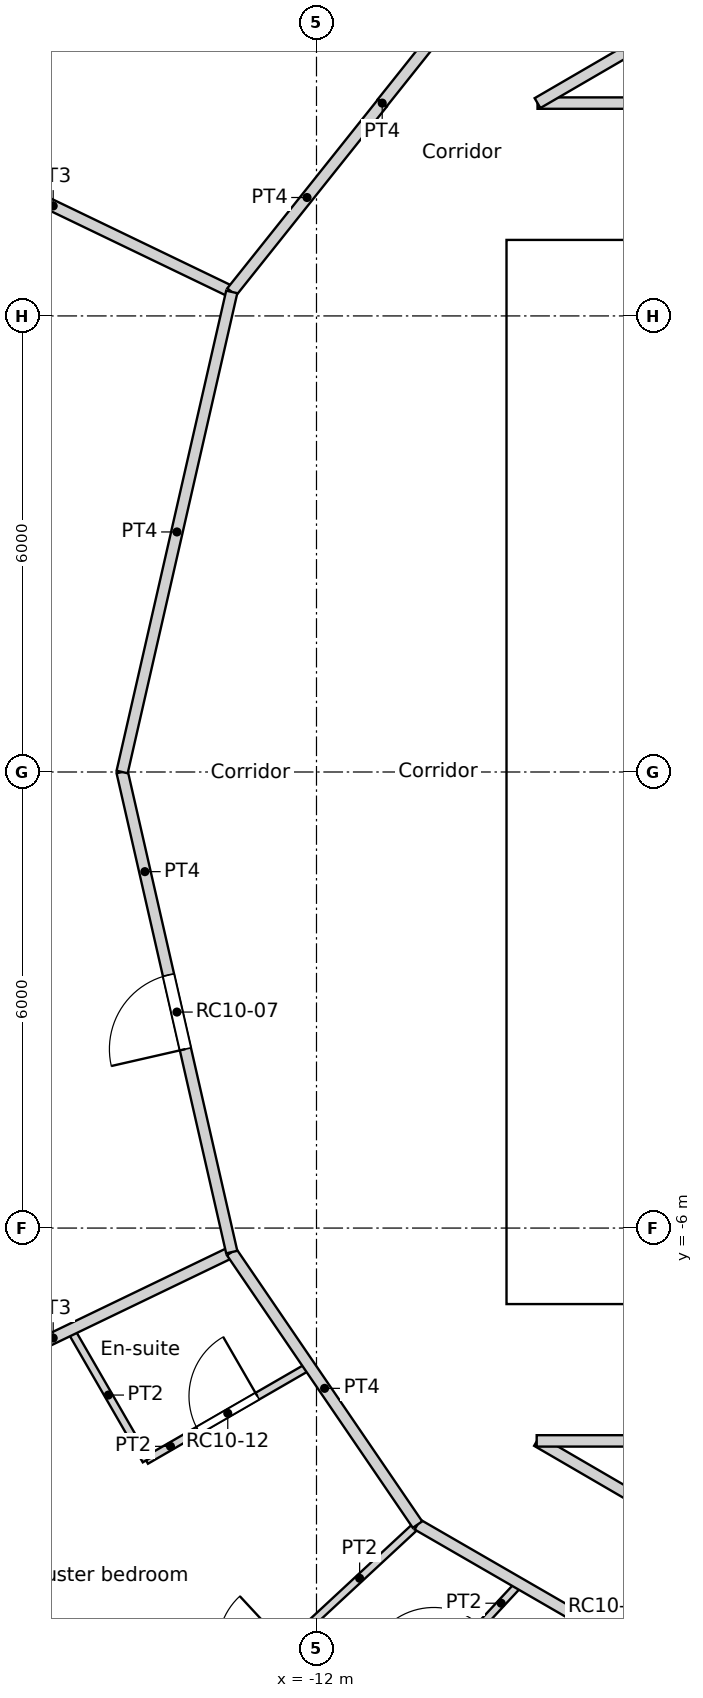
"""IFC4 building model, lengths in metres.
Left out: names, types, materials, properties, quantities, classifications, styles, units other than length and angle.
Written with IfcOpenShell. Run it as: python <this file> out.ifc"""

import sys

from ifc_helpers import new_model, si_unit, direction, frame, frame_2d, origin, place, context, subcontext, project, spatial, rectangle, extrude, element, fill, save


model = new_model("IFC4")
c1 = context("Model", 3, precision=1e-05, world=origin(), true_north=direction((0.0, 1.0)))
c2 = subcontext(c1, "Body", "Model", "MODEL_VIEW")
j1 = project(units=[si_unit("LENGTHUNIT", "METRE"), si_unit("PLANEANGLEUNIT", "RADIAN")], contexts=[c1])
p1 = place(None, origin())
s1 = spatial("IfcSite", under=j1, at=p1, CompositionType="ELEMENT")
p2 = place(p1, origin())
s2 = spatial("IfcBuilding", under=s1, at=p2, CompositionType="ELEMENT")
p3 = place(p2, frame((0.0, 0.0, 323.4)))
s3 = spatial("IfcBuildingStorey", under=s2, at=p3, CompositionType="ELEMENT", Elevation=323.4)
p4 = place(p3, frame((-9.5, -6.7, 0.0), z_axis=(0.0, 0.0, 1.0), x_axis=(1.0, 0.0, 0.0)))
e1 = element("IfcWall", 1, at=p4, inside=s3, PredefinedType="SOLIDWALL", context=c2, shape_type="SweptSolid", body=[
    extrude(rectangle(XDim=19.0, YDim=0.6, at=frame_2d((9.5, 0.0))), origin(), (0.0, 0.0, 1.0), 3.6),
])
p5 = place(p4, frame((10.4, 0.0, 0.0)))
e2 = element("IfcOpeningElement", 2, at=p5, cuts=e1, PredefinedType="OPENING", context=c2, shape_type="SweptSolid", body=[
    extrude(rectangle(XDim=1.0, YDim=2.1, at=frame_2d((0.5, 1.05))), frame((0.0, 0.3, 0.0), z_axis=(0.0, -1.0, 0.0), x_axis=(1.0, 0.0, 0.0)), (0.0, 0.0, 1.0), 0.6),
])
p6 = place(p4, frame((5.35, 0.0, 0.0)))
e3 = element("IfcOpeningElement", 3, at=p6, cuts=e1, PredefinedType="OPENING", context=c2, shape_type="SweptSolid", body=[
    extrude(rectangle(XDim=1.7, YDim=2.1, at=frame_2d((0.85, 1.05))), frame((0.0, 0.3, 0.0), z_axis=(0.0, -1.0, 0.0), x_axis=(1.0, 0.0, 0.0)), (0.0, 0.0, 1.0), 0.6),
])
p7 = place(p4, frame((11.95, 0.0, 0.0)))
e4 = element("IfcOpeningElement", 4, at=p7, cuts=e1, PredefinedType="OPENING", context=c2, shape_type="SweptSolid", body=[
    extrude(rectangle(XDim=1.7, YDim=2.1, at=frame_2d((0.85, 1.05))), frame((0.0, 0.3, 0.0), z_axis=(0.0, -1.0, 0.0), x_axis=(1.0, 0.0, 0.0)), (0.0, 0.0, 1.0), 0.6),
])
p8 = place(p3, frame((-9.5, 6.7, 0.0), z_axis=(0.0, 0.0, 1.0), x_axis=(1.0, 0.0, 0.0)))
e5 = element("IfcWall", 5, at=p8, inside=s3, PredefinedType="SOLIDWALL", context=c2, shape_type="SweptSolid", body=[
    extrude(rectangle(XDim=19.0, YDim=0.6, at=frame_2d((9.5, 0.0))), origin(), (0.0, 0.0, 1.0), 3.6),
])
p9 = place(p8, frame((5.35, 0.0, 0.0)))
e6 = element("IfcOpeningElement", 6, at=p9, cuts=e5, PredefinedType="OPENING", context=c2, shape_type="SweptSolid", body=[
    extrude(rectangle(XDim=1.7, YDim=2.1, at=frame_2d((0.85, 1.05))), frame((0.0, 0.3, 0.0), z_axis=(0.0, -1.0, 0.0), x_axis=(1.0, 0.0, 0.0)), (0.0, 0.0, 1.0), 0.6),
])
p10 = place(p3, frame((-9.2, -6.4, 0.0), z_axis=(0.0, 0.0, 1.0), x_axis=(0.0, 1.0, 0.0)))
e7 = element("IfcWall", 7, at=p10, inside=s3, PredefinedType="SOLIDWALL", context=c2, shape_type="SweptSolid", body=[
    extrude(rectangle(XDim=12.8, YDim=0.6, at=frame_2d((6.4, 0.0))), origin(), (0.0, 0.0, 1.0), 3.6),
])
p11 = place(p3, frame((-8.9, -3.1, 0.0), z_axis=(0.0, 0.0, 1.0), x_axis=(1.0, 0.0, 0.0)))
e8 = element("IfcWall", 8, at=p11, inside=s3, PredefinedType="SOLIDWALL", context=c2, shape_type="SweptSolid", body=[
    extrude(rectangle(XDim=9.6, YDim=0.3, at=frame_2d((4.8, 0.0))), origin(), (0.0, 0.0, 1.0), 3.25),
])
p12 = place(p11, frame((4.75, 0.0, 0.0)))
e9 = element("IfcOpeningElement", 9, at=p12, cuts=e8, PredefinedType="OPENING", context=c2, shape_type="SweptSolid", body=[
    extrude(rectangle(XDim=1.7, YDim=2.1, at=frame_2d((0.85, 1.05))), frame((0.0, 0.15, 0.0), z_axis=(0.0, -1.0, 0.0), x_axis=(1.0, 0.0, 0.0)), (0.0, 0.0, 1.0), 0.3),
])
p13 = place(p3, frame((-8.9, 3.1, 0.0), z_axis=(0.0, 0.0, 1.0), x_axis=(1.0, 0.0, 0.0)))
e10 = element("IfcWall", 10, at=p13, inside=s3, PredefinedType="SOLIDWALL", context=c2, shape_type="SweptSolid", body=[
    extrude(rectangle(XDim=4.55, YDim=0.3, at=frame_2d((2.275, 0.0))), origin(), (0.0, 0.0, 1.0), 3.25),
])
p14 = place(p3, frame((-8.9, 0.0, 0.0), z_axis=(0.0, 0.0, 1.0), x_axis=(1.0, 0.0, 0.0)))
e11 = element("IfcWall", 11, at=p14, inside=s3, PredefinedType="SOLIDWALL", context=c2, shape_type="SweptSolid", body=[
    extrude(rectangle(XDim=3.0, YDim=0.3, at=frame_2d((1.5, 0.0))), origin(), (0.0, 0.0, 1.0), 3.25),
])
p15 = place(p3, frame((-9.092, 8.8, 0.0), z_axis=(0.0, 0.0, 1.0), x_axis=(0.864470922103, 0.502682827277, 0.0)))
e12 = element("IfcWall", 12, at=p15, inside=s3, PredefinedType="PARTITIONING", context=c2, shape_type="SweptSolid", body=[
    extrude(rectangle(XDim=6.735, YDim=0.15, at=frame_2d((3.368, 0.0))), origin(), (0.0, 0.0, 1.0), 3.25),
])
p16 = place(p3, frame((-9.092, 8.8, 0.0), z_axis=(0.0, 0.0, 1.0), x_axis=(1.0, 0.0, 0.0)))
e13 = element("IfcWall", 13, at=p16, inside=s3, PredefinedType="PARTITIONING", context=c2, shape_type="SweptSolid", body=[
    extrude(rectangle(XDim=7.286, YDim=0.15, at=frame_2d((3.643, 0.0))), origin(), (0.0, 0.0, 1.0), 3.25),
])
p17 = place(p16, frame((3.143, 0.0, 0.0)))
e14 = element("IfcOpeningElement", 14, at=p17, cuts=e13, PredefinedType="OPENING", context=c2, shape_type="SweptSolid", body=[
    extrude(rectangle(XDim=1.0, YDim=2.04, at=frame_2d((0.5, 1.02))), frame((0.0, 0.075, 0.0), z_axis=(0.0, -1.0, 0.0), x_axis=(1.0, 0.0, 0.0)), (0.0, 0.0, 1.0), 0.15),
])
p18 = place(p3, frame((-11.134, 8.8, 0.0), z_axis=(0.0, 0.0, 1.0), x_axis=(-1.0, 0.0, 0.0)))
e15 = element("IfcWall", 15, at=p18, inside=s3, PredefinedType="PARTITIONING", context=c2, shape_type="SweptSolid", body=[
    extrude(rectangle(XDim=0.003, YDim=0.15, at=frame_2d((0.001, 0.0))), origin(), (0.0, 0.0, 1.0), 3.25),
])
p19 = place(p3, frame((-11.136, 8.802, 0.0), z_axis=(0.0, 0.0, 1.0), x_axis=(0.623151397235, 0.782101231379, 0.0)))
e16 = element("IfcWall", 16, at=p19, inside=s3, PredefinedType="PARTITIONING", context=c2, shape_type="SweptSolid", body=[
    extrude(rectangle(XDim=3.301, YDim=0.15, at=frame_2d((1.65, 0.0))), origin(), (0.0, 0.0, 1.0), 3.25),
])
p20 = place(p3, frame((-9.103, -8.8, 0.0), z_axis=(0.0, 0.0, 1.0), x_axis=(1.0, 0.0, 0.0)))
e17 = element("IfcWall", 17, at=p20, inside=s3, PredefinedType="PARTITIONING", context=c2, shape_type="SweptSolid", body=[
    extrude(rectangle(XDim=18.204, YDim=0.15, at=frame_2d((9.102, 0.0))), origin(), (0.0, 0.0, 1.0), 3.25),
])
p21 = place(p20, frame((8.597, 0.0, 0.0)))
e18 = element("IfcOpeningElement", 18, at=p21, cuts=e17, PredefinedType="OPENING", context=c2, shape_type="SweptSolid", body=[
    extrude(rectangle(XDim=1.0, YDim=2.04, at=frame_2d((0.5, 1.02))), frame((0.0, 0.075, 0.0), z_axis=(0.0, -1.0, 0.0), x_axis=(1.0, 0.0, 0.0)), (0.0, 0.0, 1.0), 0.15),
])
p22 = place(p3, frame((-9.099, -8.8, 0.0), z_axis=(0.0, 0.0, 1.0), x_axis=(0.864286794128, -0.502999341447, 0.0)))
e19 = element("IfcWall", 19, at=p22, inside=s3, PredefinedType="PARTITIONING", context=c2, shape_type="SweptSolid", body=[
    extrude(rectangle(XDim=6.741, YDim=0.15, at=frame_2d((3.371, 0.0))), origin(), (0.0, 0.0, 1.0), 3.25),
])
p23 = place(p3, frame((-13.115, 6.316, 0.0), z_axis=(0.0, 0.0, 1.0), x_axis=(0.623476099415, 0.781842409606, 0.0)))
e20 = element("IfcWall", 20, at=p23, inside=s3, PredefinedType="PARTITIONING", context=c2, shape_type="SweptSolid", body=[
    extrude(rectangle(XDim=3.177, YDim=0.15, at=frame_2d((1.589, 0.0))), origin(), (0.0, 0.0, 1.0), 3.25),
])
p24 = place(p3, frame((-14.557, 0.0, 0.0), z_axis=(0.0, 0.0, 1.0), x_axis=(0.222568978642, -0.97491694505, 0.0)))
e21 = element("IfcWall", 21, at=p24, inside=s3, PredefinedType="PARTITIONING", context=c2, shape_type="SweptSolid", body=[
    extrude(rectangle(XDim=6.479, YDim=0.15, at=frame_2d((3.239, 0.0))), origin(), (0.0, 0.0, 1.0), 3.25),
])
p25 = place(p24, frame((2.74, 0.0, 0.0)))
e22 = element("IfcOpeningElement", 22, at=p25, cuts=e21, PredefinedType="OPENING", context=c2, shape_type="SweptSolid", body=[
    extrude(rectangle(XDim=1.0, YDim=2.04, at=frame_2d((0.5, 1.02))), frame((0.0, 0.075, 0.0), z_axis=(0.0, -1.0, 0.0), x_axis=(1.0, 0.0, 0.0)), (0.0, 0.0, 1.0), 0.15),
])
p26 = place(p3, frame((-14.557, 0.0, 0.0), z_axis=(0.0, 0.0, 1.0), x_axis=(0.222568978642, 0.97491694505, 0.0)))
e23 = element("IfcWall", 23, at=p26, inside=s3, PredefinedType="PARTITIONING", context=c2, shape_type="SweptSolid", body=[
    extrude(rectangle(XDim=6.479, YDim=0.15, at=frame_2d((3.239, 0.0))), origin(), (0.0, 0.0, 1.0), 3.25),
])
p27 = place(p3, frame((-10.671, -9.901, 0.0), z_axis=(0.0, 0.0, 1.0), x_axis=(0.865823993551, -0.500348690606, 0.0)))
e24 = element("IfcWall", 24, at=p27, inside=s3, PredefinedType="PARTITIONING", context=c2, shape_type="SweptSolid", body=[
    extrude(rectangle(XDim=8.582, YDim=0.15, at=frame_2d((4.291, 0.0))), origin(), (0.0, 0.0, 1.0), 3.25),
])
p28 = place(p27, frame((2.369, 0.0, 0.0)))
e25 = element("IfcOpeningElement", 25, at=p28, cuts=e24, PredefinedType="OPENING", context=c2, shape_type="SweptSolid", body=[
    extrude(rectangle(XDim=1.1, YDim=2.1, at=frame_2d((0.55, 1.05))), frame((0.0, 0.075, 0.0), z_axis=(0.0, -1.0, 0.0), x_axis=(1.0, 0.0, 0.0)), (0.0, 0.0, 1.0), 0.15),
])
p29 = place(p3, frame((-13.115, -6.316, 0.0), z_axis=(0.0, 0.0, 1.0), x_axis=(0.563434599286, -0.826160669802, 0.0)))
e26 = element("IfcWall", 26, at=p29, inside=s3, PredefinedType="PARTITIONING", context=c2, shape_type="SweptSolid", body=[
    extrude(rectangle(XDim=4.339, YDim=0.15, at=frame_2d((2.169, 0.0))), origin(), (0.0, 0.0, 1.0), 3.25),
])
for number, where, z_axis, x_axis in (
    (27, (-17.813, 8.578, 0.0), (0.0, 0.0, 1.0), (0.901, -0.434, 0.0)),
    (28, (-17.813, -8.578, 0.0), (0.0, 0.0, 1.0), (0.901, 0.434, 0.0)),
):
    element("IfcWall", number, at=place(p3, frame(where, z_axis=z_axis, x_axis=x_axis)), inside=s3, PredefinedType="PARTITIONING", context=c2, shape_type="SweptSolid", body=[
        extrude(rectangle(XDim=5.214, YDim=0.15, at=frame_2d((2.607, 0.0))), origin(), (0.0, 0.0, 1.0), 3.25),
    ])
p30 = place(p3, frame((-10.973, -12.447, 0.0), z_axis=(0.0, 0.0, 1.0), x_axis=(0.680296065293, 0.732937421303, 0.0)))
e29 = element("IfcWall", 29, at=p30, inside=s3, PredefinedType="PARTITIONING", context=c2, shape_type="SweptSolid", body=[
    extrude(rectangle(XDim=2.416, YDim=0.1, at=frame_2d((1.208, 0.0))), origin(), (0.0, 0.0, 1.0), 3.25),
])
p31 = place(p30, frame((0.758, 0.0, 0.0)))
e30 = element("IfcOpeningElement", 30, at=p31, cuts=e29, PredefinedType="OPENING", context=c2, shape_type="SweptSolid", body=[
    extrude(rectangle(XDim=0.9, YDim=2.0, at=frame_2d((0.45, 1.0))), frame((0.0, 0.05, 0.0), z_axis=(0.0, -1.0, 0.0), x_axis=(1.0, 0.0, 0.0)), (0.0, 0.0, 1.0), 0.1),
])
p32 = place(p3, frame((-12.194, -11.314, 0.0), z_axis=(0.0, 0.0, 1.0), x_axis=(0.733107294142, 0.680113001843, 0.0)))
e31 = element("IfcWall", 31, at=p32, inside=s3, PredefinedType="PARTITIONING", context=c2, shape_type="SweptSolid", body=[
    extrude(rectangle(XDim=2.078, YDim=0.1, at=frame_2d((1.039, 0.0))), origin(), (0.0, 0.0, 1.0), 3.25),
])
p33 = place(p3, frame((-15.235, -7.337, 0.0), z_axis=(0.0, 0.0, 1.0), x_axis=(0.50005230485, -0.865995203459, 0.0)))
e32 = element("IfcWall", 32, at=p33, inside=s3, PredefinedType="PARTITIONING", context=c2, shape_type="SweptSolid", body=[
    extrude(rectangle(XDim=1.986, YDim=0.1, at=frame_2d((0.993, 0.0))), origin(), (0.0, 0.0, 1.0), 3.25),
])
p34 = place(p3, frame((-14.242, -9.057, 0.0), z_axis=(0.0, 0.0, 1.0), x_axis=(0.865975856927, 0.500085807857, 0.0)))
e33 = element("IfcWall", 33, at=p34, inside=s3, PredefinedType="PARTITIONING", context=c2, shape_type="SweptSolid", body=[
    extrude(rectangle(XDim=2.481, YDim=0.1, at=frame_2d((1.241, 0.0))), origin(), (0.0, 0.0, 1.0), 3.25),
])
p35 = place(p34, frame((0.791, 0.0, 0.0)))
e34 = element("IfcOpeningElement", 34, at=p35, cuts=e33, PredefinedType="OPENING", context=c2, shape_type="SweptSolid", body=[
    extrude(rectangle(XDim=0.9, YDim=2.04, at=frame_2d((0.45, 1.02))), frame((0.0, 0.05, 0.0), z_axis=(0.0, -1.0, 0.0), x_axis=(1.0, 0.0, 0.0)), (0.0, 0.0, 1.0), 0.1),
])
p36 = place(p25, origin())
e35 = element("IfcDoor", 35, at=p36, inside=s3, OperationType="SINGLE_SWING_LEFT", PredefinedType="DOOR", context=c2, shape_type="SweptSolid", body=[
    extrude(rectangle(XDim=1.0, YDim=2.04, at=frame_2d((0.5, 1.02))), frame((0.0, 0.025, 0.0), z_axis=(0.0, -1.0, 0.0), x_axis=(1.0, 0.0, 0.0)), (0.0, 0.0, 1.0), 0.05),
])
fill(e22, e35)
p37 = place(p28, origin())
e36 = element("IfcDoor", 36, at=p37, inside=s3, OperationType="SINGLE_SWING_RIGHT", PredefinedType="DOOR", context=c2, shape_type="SweptSolid", body=[
    extrude(rectangle(XDim=1.1, YDim=2.1, at=frame_2d((0.55, 1.05))), frame((0.0, 0.025, 0.0), z_axis=(0.0, -1.0, 0.0), x_axis=(1.0, 0.0, 0.0)), (0.0, 0.0, 1.0), 0.05),
])
fill(e25, e36)
p38 = place(p35, origin())
e37 = element("IfcDoor", 37, at=p38, inside=s3, OperationType="SINGLE_SWING_RIGHT", PredefinedType="DOOR", context=c2, shape_type="SweptSolid", body=[
    extrude(rectangle(XDim=0.9, YDim=2.04, at=frame_2d((0.45, 1.02))), frame((0.0, 0.025, 0.0), z_axis=(0.0, -1.0, 0.0), x_axis=(1.0, 0.0, 0.0)), (0.0, 0.0, 1.0), 0.05),
])
fill(e34, e37)
save(model, sys.argv[1])
